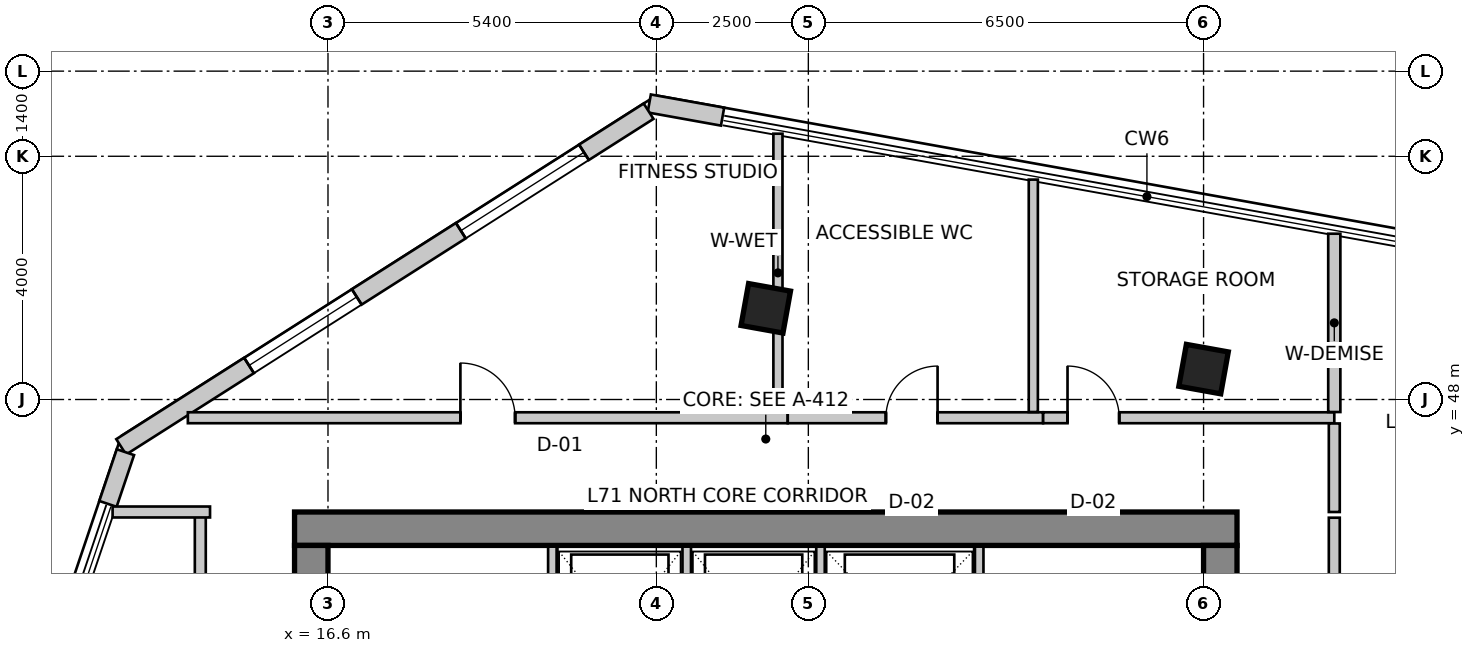
"""IFC4 building model, lengths in metres.
Left out: names, types, materials, properties, quantities, classifications, styles, units other than length and angle.
Written with IfcOpenShell. Run it as: python <this file> out.ifc"""

import sys

from ifc_helpers import new_model, si_unit, direction, frame, frame_2d, origin, origin_2d, place, context, subcontext, project, spatial, rectangle, extrude, source, transform, mapped, element, fill, save


model = new_model("IFC4")
c1 = context("Model", 3, precision=1e-05, world=origin(), true_north=direction((0.0, 1.0)))
c2 = subcontext(c1, "Body", "Model", "MODEL_VIEW")
j1 = project(units=[si_unit("LENGTHUNIT", "METRE"), si_unit("PLANEANGLEUNIT", "RADIAN")], contexts=[c1])
p1 = place(None, origin())
s1 = spatial("IfcSite", under=j1, at=p1, CompositionType="ELEMENT")
p2 = place(p1, origin())
s2 = spatial("IfcBuilding", under=s1, at=p2, CompositionType="ELEMENT")
p3 = place(p2, frame((0.0, 0.0, 278.1)))
s3 = spatial("IfcBuildingStorey", under=s2, at=p3, CompositionType="ELEMENT", Elevation=278.1)
p4 = place(p3, frame((16.05, 45.875, 0.0), z_axis=(0.0, 0.0, 1.0), x_axis=(1.0, 0.0, 0.0)))
e1 = element("IfcWall", 1, at=p4, inside=s3, PredefinedType="SHEAR", context=c2, shape_type="SweptSolid", body=[
    extrude(rectangle(XDim=15.5, YDim=0.55, at=frame_2d((7.75, 0.0))), origin(), (0.0, 0.0, 1.0), 3.6),
])
p5 = place(p3, frame((16.325, 34.2, 0.0), z_axis=(0.0, 0.0, 1.0), x_axis=(0.0, 1.0, 0.0)))
e2 = element("IfcWall", 2, at=p5, inside=s3, PredefinedType="SHEAR", context=c2, shape_type="SweptSolid", body=[
    extrude(rectangle(XDim=11.4, YDim=0.55, at=frame_2d((5.7, 0.0))), origin(), (0.0, 0.0, 1.0), 3.6),
])
m1 = source(origin(), c2, "Body", "SweptSolid", [
    extrude(rectangle(XDim=1.1, YDim=2.15, at=frame_2d((0.55, 1.075))), frame((0.0, 0.285, 0.0), z_axis=(0.0, -1.0, 0.0), x_axis=(1.0, 0.0, 0.0)), (0.0, 0.0, 1.0), 0.57),
])
p6 = place(p5, frame((7.15, 0.0, 0.0)))
e3 = element("IfcOpeningElement", 3, at=p6, cuts=e2, PredefinedType="OPENING", context=c2, shape_type="MappedRepresentation", body=[
    mapped(m1, transform((0.0, 0.0, 0.0), scale=1.0)),
])
p7 = place(p3, frame((31.275, 34.2, 0.0), z_axis=(0.0, 0.0, 1.0), x_axis=(0.0, 1.0, 0.0)))
e4 = element("IfcWall", 4, at=p7, inside=s3, PredefinedType="SHEAR", context=c2, shape_type="SweptSolid", body=[
    extrude(rectangle(XDim=11.4, YDim=0.55, at=frame_2d((5.7, 0.0))), origin(), (0.0, 0.0, 1.0), 3.6),
])
p8 = place(p7, frame((7.35, 0.0, 0.0)))
e5 = element("IfcOpeningElement", 5, at=p8, cuts=e4, PredefinedType="OPENING", context=c2, shape_type="MappedRepresentation", body=[
    mapped(m1, transform((0.0, 0.0, 0.0), scale=1.0)),
])
m2 = source(origin(), c2, "Body", "SweptSolid", [
    extrude(rectangle(XDim=0.7, YDim=0.7, at=origin_2d()), origin(), (0.0, 0.0, 1.0), 3.6),
])
for number, where, z_axis, x_axis in (
    (6, (23.8, 49.5, 0.0), (0.0, 0.0, 1.0), (0.984, -0.177, 0.0)),
    (7, (31.0, 48.5, 0.0), (0.0, 0.0, 1.0), (0.984, -0.177, 0.0)),
):
    element("IfcColumn", number, at=place(p3, frame(where, z_axis=z_axis, x_axis=x_axis)), inside=s3, PredefinedType="COLUMN", context=c2, shape_type="MappedRepresentation", body=[
        mapped(m2, transform((0.0, 0.0, 0.0), scale=1.0)),
    ])
p9 = place(p3, frame((23.089, 52.652, 0.0), z_axis=(0.0, 0.0, 1.0), x_axis=(-0.984247203219, 0.1767977459, 0.0)))
e8 = element("IfcWall", 8, at=p9, inside=s3, PredefinedType="SOLIDWALL", context=c2, shape_type="SweptSolid", body=[
    extrude(rectangle(XDim=1.225, YDim=0.3, at=frame_2d((0.612, 0.0))), origin(), (0.0, 0.0, 1.0), 3.35),
])
p10 = place(p3, frame((21.873, 52.741, 0.0), z_axis=(0.0, 0.0, 1.0), x_axis=(-0.843661487732, -0.536875492193, 0.0)))
e9 = element("IfcWall", 9, at=p10, inside=s3, PredefinedType="SOLIDWALL", context=c2, shape_type="SweptSolid", body=[
    extrude(rectangle(XDim=10.282, YDim=0.3, at=frame_2d((5.141, 0.0))), origin(), (0.0, 0.0, 1.0), 3.35),
])
m3 = source(origin(), c2, "Body", "SweptSolid", [
    extrude(rectangle(XDim=2.4, YDim=2.2, at=frame_2d((1.2, 1.1))), frame((0.0, 0.16, 0.0), z_axis=(0.0, -1.0, 0.0), x_axis=(1.0, 0.0, 0.0)), (0.0, 0.0, 1.0), 0.32),
])
p11 = place(p10, frame((1.26, 0.0, 0.85)))
e10 = element("IfcOpeningElement", 10, at=p11, cuts=e9, PredefinedType="OPENING", context=c2, shape_type="MappedRepresentation", body=[
    mapped(m3, transform((0.0, 0.0, 0.0), scale=1.0)),
])
m4 = source(origin(), c2, "Body", "SweptSolid", [
    extrude(rectangle(XDim=2.1, YDim=2.0, at=frame_2d((1.05, 1.0))), frame((0.0, 0.16, 0.0), z_axis=(0.0, -1.0, 0.0), x_axis=(1.0, 0.0, 0.0)), (0.0, 0.0, 1.0), 0.32),
])
p12 = place(p10, frame((5.689, 0.0, 0.85)))
e11 = element("IfcOpeningElement", 11, at=p12, cuts=e9, PredefinedType="OPENING", context=c2, shape_type="MappedRepresentation", body=[
    mapped(m4, transform((0.0, 0.0, 0.0), scale=1.0)),
])
p13 = place(p3, frame((13.269, 47.134, 0.0), z_axis=(0.0, 0.0, 1.0), x_axis=(-0.320141844474, -0.947369621329, 0.0)))
e12 = element("IfcWall", 12, at=p13, inside=s3, PredefinedType="SOLIDWALL", context=c2, shape_type="SweptSolid", body=[
    extrude(rectangle(XDim=0.897, YDim=0.3, at=frame_2d((0.449, 0.0))), origin(), (0.0, 0.0, 1.0), 3.35),
])
for number, where, z_axis, x_axis in (
    (13, (20.29, 43.28, 0.0), (0.0, 0.0, 1.0), (0.0, 1.0, 0.0)),
    (14, (27.31, 43.28, 0.0), (0.0, 0.0, 1.0), (0.0, 1.0, 0.0)),
):
    element("IfcWall", number, at=place(p3, frame(where, z_axis=z_axis, x_axis=x_axis)), inside=s3, PredefinedType="SOLIDWALL", context=c2, shape_type="SweptSolid", body=[
        extrude(rectangle(XDim=2.3, YDim=0.14, at=frame_2d((1.15, 0.0))), origin(), (0.0, 0.0, 1.0), 3.35),
    ])
for number, where, z_axis, x_axis in (
    (15, (22.5, 43.02, 0.0), (0.0, 0.0, 1.0), (0.0, 1.0, 0.0)),
    (16, (24.7, 43.02, 0.0), (0.0, 0.0, 1.0), (0.0, 1.0, 0.0)),
):
    element("IfcWall", number, at=place(p3, frame(where, z_axis=z_axis, x_axis=x_axis)), inside=s3, PredefinedType="SOLIDWALL", context=c2, shape_type="SweptSolid", body=[
        extrude(rectangle(XDim=2.56, YDim=0.14, at=frame_2d((1.28, 0.0))), origin(), (0.0, 0.0, 1.0), 3.35),
    ])
p14 = place(p3, frame((14.5, 33.744, 0.0), z_axis=(0.0, 0.0, 1.0), x_axis=(0.0, 1.0, 0.0)))
e17 = element("IfcWall", 17, at=p14, inside=s3, PredefinedType="PARTITIONING", context=c2, shape_type="SweptSolid", body=[
    extrude(rectangle(XDim=12.406, YDim=0.18, at=frame_2d((6.203, 0.0))), origin(), (0.0, 0.0, 1.0), 3.35),
])
m5 = source(origin(), c2, "Body", "SweptSolid", [
    extrude(rectangle(XDim=0.9, YDim=2.15, at=frame_2d((0.45, 1.075))), frame((0.0, 0.1, 0.0), z_axis=(0.0, -1.0, 0.0), x_axis=(1.0, 0.0, 0.0)), (0.0, 0.0, 1.0), 0.2),
])
p15 = place(p14, frame((4.37, 0.0, 0.0)))
e18 = element("IfcOpeningElement", 18, at=p15, cuts=e17, PredefinedType="OPENING", context=c2, shape_type="MappedRepresentation", body=[
    mapped(m5, transform((0.0, 0.0, 0.0), scale=1.0)),
])
p16 = place(p3, frame((14.66, 46.15, 0.0), z_axis=(0.0, 0.0, 1.0), x_axis=(-1.0, 0.0, 0.0)))
e19 = element("IfcWall", 19, at=p16, inside=s3, PredefinedType="PARTITIONING", context=c2, shape_type="SweptSolid", body=[
    extrude(rectangle(XDim=1.602, YDim=0.18, at=frame_2d((0.801, 0.0))), origin(), (0.0, 0.0, 1.0), 3.35),
])
p17 = place(p3, frame((14.295, 47.7, 0.0), z_axis=(0.0, 0.0, 1.0), x_axis=(1.0, 0.0, 0.0)))
e20 = element("IfcWall", 20, at=p17, inside=s3, PredefinedType="PARTITIONING", context=c2, shape_type="SweptSolid", body=[
    extrude(rectangle(XDim=9.865, YDim=0.18, at=frame_2d((4.932, 0.0))), origin(), (0.0, 0.0, 1.0), 3.034),
])
p18 = place(p17, frame((4.482, 0.0, 0.0)))
e21 = element("IfcOpeningElement", 21, at=p18, cuts=e20, PredefinedType="OPENING", context=c2, shape_type="MappedRepresentation", body=[
    mapped(m5, transform((0.0, 0.0, 0.0), scale=1.0)),
])
p19 = place(p3, frame((24.162, 47.7, 0.0), z_axis=(0.0, 0.0, 1.0), x_axis=(1.0, 0.0, 0.0)))
e22 = element("IfcWall", 22, at=p19, inside=s3, PredefinedType="PARTITIONING", context=c2, shape_type="SweptSolid", body=[
    extrude(rectangle(XDim=4.198, YDim=0.18, at=frame_2d((2.099, 0.0))), origin(), (0.0, 0.0, 1.0), 3.35),
])
m6 = source(origin(), c2, "Body", "SweptSolid", [
    extrude(rectangle(XDim=0.85, YDim=2.15, at=frame_2d((0.425, 1.075))), frame((0.0, 0.1, 0.0), z_axis=(0.0, -1.0, 0.0), x_axis=(1.0, 0.0, 0.0)), (0.0, 0.0, 1.0), 0.2),
])
p20 = place(p19, frame((1.613, 0.0, 0.0)))
e23 = element("IfcOpeningElement", 23, at=p20, cuts=e22, PredefinedType="OPENING", context=c2, shape_type="MappedRepresentation", body=[
    mapped(m6, transform((0.0, 0.0, 0.0), scale=1.0)),
])
p21 = place(p3, frame((28.362, 47.7, 0.0), z_axis=(0.0, 0.0, 1.0), x_axis=(1.0, 0.0, 0.0)))
e24 = element("IfcWall", 24, at=p21, inside=s3, PredefinedType="PARTITIONING", context=c2, shape_type="SweptSolid", body=[
    extrude(rectangle(XDim=4.788, YDim=0.18, at=frame_2d((2.394, 0.0))), origin(), (0.0, 0.0, 1.0), 2.922),
])
p22 = place(p21, frame((0.401, 0.0, 0.0)))
e25 = element("IfcOpeningElement", 25, at=p22, cuts=e24, PredefinedType="OPENING", context=c2, shape_type="MappedRepresentation", body=[
    mapped(m6, transform((0.0, 0.0, 0.0), scale=1.0)),
])
p23 = place(p3, frame((33.15, 47.606, 0.0), z_axis=(0.0, 0.0, 1.0), x_axis=(0.0, -1.0, 0.0)))
e26 = element("IfcWall", 26, at=p23, inside=s3, PredefinedType="PARTITIONING", context=c2, shape_type="SweptSolid", body=[
    extrude(rectangle(XDim=1.456, YDim=0.18, at=frame_2d((0.728, 0.0))), origin(), (0.0, 0.0, 1.0), 3.35),
])
p24 = place(p3, frame((33.15, 46.056, 0.0), z_axis=(0.0, 0.0, 1.0), x_axis=(0.0, -1.0, 0.0)))
e27 = element("IfcWall", 27, at=p24, inside=s3, PredefinedType="PARTITIONING", context=c2, shape_type="SweptSolid", body=[
    extrude(rectangle(XDim=4.689, YDim=0.18, at=frame_2d((2.344, 0.0))), origin(), (0.0, 0.0, 1.0), 2.922),
])
p25 = place(p24, frame((1.895, 0.0, 0.0)))
e28 = element("IfcOpeningElement", 28, at=p25, cuts=e27, PredefinedType="OPENING", context=c2, shape_type="MappedRepresentation", body=[
    mapped(m5, transform((0.0, 0.0, 0.0), scale=1.0)),
])
p26 = place(p3, frame((24.0, 52.371, 0.0), z_axis=(0.0, 0.0, 1.0), x_axis=(0.0, -1.0, 0.0)))
e29 = element("IfcWall", 29, at=p26, inside=s3, PredefinedType="PARTITIONING", context=c2, shape_type="SweptSolid", body=[
    extrude(rectangle(XDim=4.577, YDim=0.15, at=frame_2d((2.289, 0.0))), origin(), (0.0, 0.0, 1.0), 2.642),
])
p27 = place(p3, frame((28.2, 51.616, 0.0), z_axis=(0.0, 0.0, 1.0), x_axis=(0.0, -1.0, 0.0)))
e30 = element("IfcWall", 30, at=p27, inside=s3, PredefinedType="PARTITIONING", context=c2, shape_type="SweptSolid", body=[
    extrude(rectangle(XDim=3.822, YDim=0.15, at=frame_2d((1.911, 0.0))), origin(), (0.0, 0.0, 1.0), 2.642),
])
p28 = place(p3, frame((33.15, 50.727, 0.0), z_axis=(0.0, 0.0, 1.0), x_axis=(0.0, -1.0, 0.0)))
e31 = element("IfcWall", 31, at=p28, inside=s3, PredefinedType="PARTITIONING", context=c2, shape_type="SweptSolid", body=[
    extrude(rectangle(XDim=2.933, YDim=0.2, at=frame_2d((1.466, 0.0))), origin(), (0.0, 0.0, 1.0), 2.642),
])
m7 = source(origin(), c2, "Body", "SweptSolid", [
    extrude(rectangle(XDim=2.4, YDim=2.2, at=frame_2d((1.2, 1.1))), frame((0.0, -0.015, 0.0), z_axis=(0.0, -1.0, 0.0), x_axis=(1.0, 0.0, 0.0)), (0.0, 0.0, 1.0), 0.06),
])
p29 = place(p11, origin())
e32 = element("IfcWindow", 32, at=p29, inside=s3, PartitioningType="SINGLE_PANEL", PredefinedType="WINDOW", context=c2, shape_type="MappedRepresentation", body=[
    mapped(m7, transform((0.0, 0.0, 0.0), scale=1.0)),
])
fill(e10, e32)
m8 = source(origin(), c2, "Body", "SweptSolid", [
    extrude(rectangle(XDim=2.1, YDim=2.0, at=frame_2d((1.05, 1.0))), frame((0.0, -0.015, 0.0), z_axis=(0.0, -1.0, 0.0), x_axis=(1.0, 0.0, 0.0)), (0.0, 0.0, 1.0), 0.06),
])
p30 = place(p12, origin())
e33 = element("IfcWindow", 33, at=p30, inside=s3, PartitioningType="SINGLE_PANEL", PredefinedType="WINDOW", context=c2, shape_type="MappedRepresentation", body=[
    mapped(m8, transform((0.0, 0.0, 0.0), scale=1.0)),
])
fill(e11, e33)
m9 = source(origin(), c2, "Body", "SweptSolid", [
    extrude(rectangle(XDim=0.9, YDim=2.15, at=frame_2d((0.45, 1.075))), frame((0.0, 0.025, 0.0), z_axis=(0.0, -1.0, 0.0), x_axis=(1.0, 0.0, 0.0)), (0.0, 0.0, 1.0), 0.05),
])
p31 = place(p18, origin())
e34 = element("IfcDoor", 34, at=p31, inside=s3, OperationType="SINGLE_SWING_LEFT", PredefinedType="DOOR", context=c2, shape_type="MappedRepresentation", body=[
    mapped(m9, transform((0.0, 0.0, 0.0), scale=1.0)),
])
fill(e21, e34)
m10 = source(origin(), c2, "Body", "SweptSolid", [
    extrude(rectangle(XDim=0.85, YDim=2.15, at=frame_2d((0.425, 1.075))), frame((0.0, 0.025, 0.0), z_axis=(0.0, -1.0, 0.0), x_axis=(1.0, 0.0, 0.0)), (0.0, 0.0, 1.0), 0.05),
])
p32 = place(p20, origin())
e35 = element("IfcDoor", 35, at=p32, inside=s3, OperationType="SINGLE_SWING_RIGHT", PredefinedType="DOOR", context=c2, shape_type="MappedRepresentation", body=[
    mapped(m10, transform((0.0, 0.0, 0.0), scale=1.0)),
])
fill(e23, e35)
p33 = place(p22, origin())
e36 = element("IfcDoor", 36, at=p33, inside=s3, OperationType="SINGLE_SWING_LEFT", PredefinedType="DOOR", context=c2, shape_type="MappedRepresentation", body=[
    mapped(m10, transform((0.0, 0.0, 0.0), scale=1.0)),
])
fill(e25, e36)
save(model, sys.argv[1])
